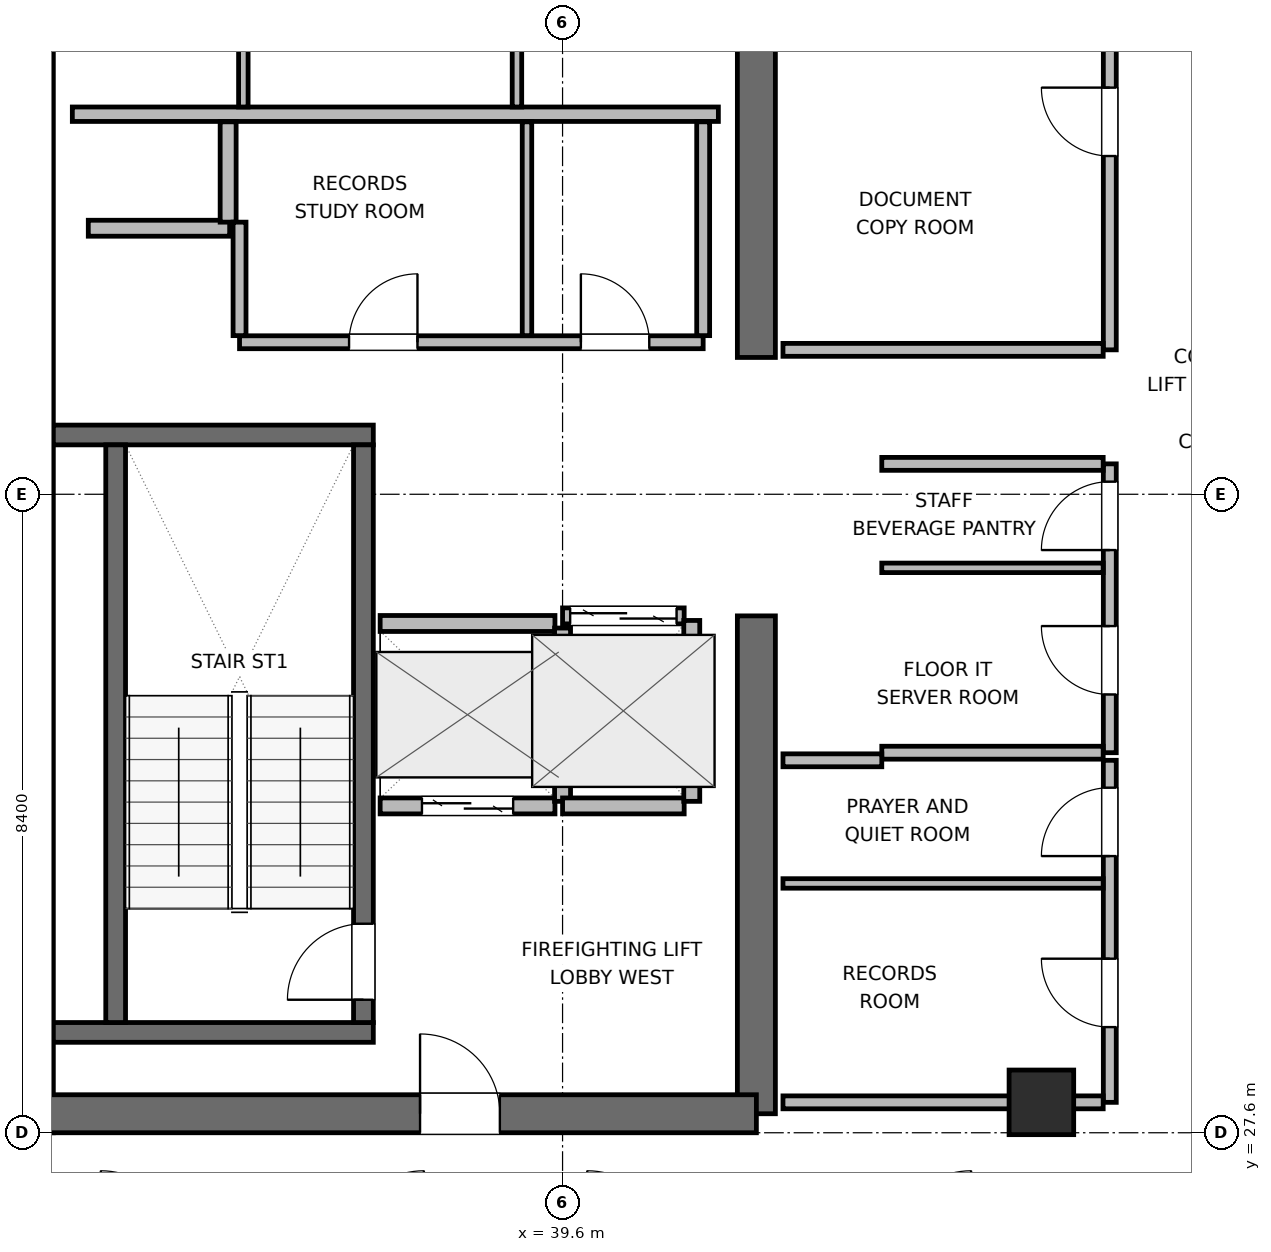
"""IFC4 building model, lengths in metres.
Left out: names, types, materials, properties, quantities, classifications, styles, units other than length and angle.
Written with IfcOpenShell. Run it as: python <this file> out.ifc"""

import sys

from ifc_helpers import new_model, si_unit, direction, frame, frame_2d, origin, origin_2d, place, context, subcontext, project, spatial, rectangle, extrude, element, fill, save


model = new_model("IFC4")
c1 = context("Model", 3, precision=1e-05, world=origin(), true_north=direction((0.0, 1.0)))
c2 = subcontext(c1, "Body", "Model", "MODEL_VIEW")
j1 = project(units=[si_unit("LENGTHUNIT", "METRE"), si_unit("PLANEANGLEUNIT", "RADIAN")], contexts=[c1])
p1 = place(None, origin())
s1 = spatial("IfcSite", under=j1, at=p1, CompositionType="ELEMENT")
p2 = place(p1, origin())
s2 = spatial("IfcBuilding", under=s1, at=p2, CompositionType="ELEMENT")
p3 = place(p2, frame((0.0, 0.0, 346.5)))
s3 = spatial("IfcBuildingStorey", under=s2, at=p3, CompositionType="ELEMENT", Elevation=346.5)
p4 = place(p3, frame((32.65, 27.6, 0.0), z_axis=(0.0, 0.0, 1.0), x_axis=(0.0, 1.0, 0.0)))
e1 = element("IfcWall", 1, at=p4, inside=s3, PredefinedType="SHEAR", context=c2, shape_type="SweptSolid", body=[
    extrude(rectangle(XDim=16.8, YDim=0.5, at=frame_2d((8.4, 0.0))), origin(), (0.0, 0.0, 1.0), 3.9),
])
p5 = place(p3, frame((42.15, 27.85, 0.0), z_axis=(0.0, 0.0, 1.0), x_axis=(0.0, 1.0, 0.0)))
e2 = element("IfcWall", 2, at=p5, inside=s3, PredefinedType="SHEAR", context=c2, shape_type="SweptSolid", body=[
    extrude(rectangle(XDim=6.55, YDim=0.5, at=frame_2d((3.275, 0.0))), origin(), (0.0, 0.0, 1.0), 3.9),
])
p6 = place(p3, frame((42.15, 37.8, 0.0), z_axis=(0.0, 0.0, 1.0), x_axis=(0.0, 1.0, 0.0)))
e3 = element("IfcWall", 3, at=p6, inside=s3, PredefinedType="SHEAR", context=c2, shape_type="SweptSolid", body=[
    extrude(rectangle(XDim=6.35, YDim=0.5, at=frame_2d((3.175, 0.0))), origin(), (0.0, 0.0, 1.0), 3.9),
])
p7 = place(p3, frame((32.65, 27.85, 0.0), z_axis=(0.0, 0.0, 1.0), x_axis=(1.0, 0.0, 0.0)))
e4 = element("IfcWall", 4, at=p7, inside=s3, PredefinedType="SHEAR", context=c2, shape_type="SweptSolid", body=[
    extrude(rectangle(XDim=9.5, YDim=0.5, at=frame_2d((4.75, 0.0))), origin(), (0.0, 0.0, 1.0), 3.9),
])
p8 = place(p7, frame((5.075, 0.0, 0.0)))
e5 = element("IfcOpeningElement", 5, at=p8, cuts=e4, PredefinedType="OPENING", context=c2, shape_type="SweptSolid", body=[
    extrude(rectangle(XDim=1.05, YDim=2.04, at=frame_2d((0.525, 1.02))), frame((0.0, 0.26, 0.0), z_axis=(0.0, -1.0, 0.0), x_axis=(1.0, 0.0, 0.0)), (0.0, 0.0, 1.0), 0.52),
])
for number, where, z_axis, x_axis in (
    (6, (32.9, 28.92, 0.0), (0.0, 0.0, 1.0), (1.0, 0.0, 0.0)),
    (7, (32.9, 36.78, 0.0), (0.0, 0.0, 1.0), (1.0, 0.0, 0.0)),
):
    element("IfcWall", number, at=place(p3, frame(where, z_axis=z_axis, x_axis=x_axis)), inside=s3, PredefinedType="SHEAR", context=c2, shape_type="SweptSolid", body=[
        extrude(rectangle(XDim=4.21, YDim=0.26, at=frame_2d((2.105, 0.0))), origin(), (0.0, 0.0, 1.0), 3.9),
    ])
p9 = place(p3, frame((33.72, 29.05, 0.0), z_axis=(0.0, 0.0, 1.0), x_axis=(0.0, 1.0, 0.0)))
e8 = element("IfcWall", 8, at=p9, inside=s3, PredefinedType="SHEAR", context=c2, shape_type="SweptSolid", body=[
    extrude(rectangle(XDim=7.6, YDim=0.26, at=frame_2d((3.8, 0.0))), origin(), (0.0, 0.0, 1.0), 3.9),
])
p10 = place(p3, frame((36.98, 29.05, 0.0), z_axis=(0.0, 0.0, 1.0), x_axis=(0.0, 1.0, 0.0)))
e9 = element("IfcWall", 9, at=p10, inside=s3, PredefinedType="SHEAR", context=c2, shape_type="SweptSolid", body=[
    extrude(rectangle(XDim=7.6, YDim=0.26, at=frame_2d((3.8, 0.0))), origin(), (0.0, 0.0, 1.0), 3.9),
])
p11 = place(p10, frame((0.3, 0.0, 0.0)))
e10 = element("IfcOpeningElement", 10, at=p11, cuts=e9, PredefinedType="OPENING", context=c2, shape_type="SweptSolid", body=[
    extrude(rectangle(XDim=1.0, YDim=2.04, at=frame_2d((0.5, 1.02))), frame((0.0, 0.14, 0.0), z_axis=(0.0, -1.0, 0.0), x_axis=(1.0, 0.0, 0.0)), (0.0, 0.0, 1.0), 0.28),
])
p12 = place(p3, frame((45.9, 28.0, 0.0), z_axis=(0.0, 0.0, 1.0), x_axis=(1.0, 0.0, 0.0)))
e11 = element("IfcColumn", 11, at=p12, inside=s3, PredefinedType="COLUMN", context=c2, shape_type="SweptSolid", body=[
    extrude(rectangle(XDim=0.85, YDim=0.85, at=origin_2d()), origin(), (0.0, 0.0, 1.0), 3.9),
])
p13 = place(p3, frame((33.15, 41.0, 0.0), z_axis=(0.0, 0.0, 1.0), x_axis=(1.0, 0.0, 0.0)))
e12 = element("IfcWall", 12, at=p13, inside=s3, PredefinedType="PLUMBINGWALL", context=c2, shape_type="SweptSolid", body=[
    extrude(rectangle(XDim=8.5, YDim=0.19, at=frame_2d((4.25, 0.0))), origin(), (0.0, 0.0, 1.0), 3.68),
])
for number, where, z_axis, x_axis in (
    (13, (35.4, 41.095, 0.0), (0.0, 0.0, 1.0), (0.0, 1.0, 0.0)),
    (14, (39.0, 41.095, 0.0), (0.0, 0.0, 1.0), (0.0, 1.0, 0.0)),
):
    element("IfcWall", number, at=place(p3, frame(where, z_axis=z_axis, x_axis=x_axis)), inside=s3, PredefinedType="PARTITIONING", context=c2, shape_type="SweptSolid", body=[
        extrude(rectangle(XDim=2.555, YDim=0.125, at=frame_2d((1.277, 0.0))), origin(), (0.0, 0.0, 1.0), 3.68),
    ])
p14 = place(p3, frame((33.36, 39.5, 0.0), z_axis=(0.0, 0.0, 1.0), x_axis=(1.0, 0.0, 0.0)))
e15 = element("IfcWall", 15, at=p14, inside=s3, PredefinedType="PARTITIONING", context=c2, shape_type="SweptSolid", body=[
    extrude(rectangle(XDim=1.86, YDim=0.21, at=frame_2d((0.93, 0.0))), origin(), (0.0, 0.0, 1.0), 3.68),
])
p15 = place(p3, frame((35.2, 39.58, 0.0), z_axis=(0.0, 0.0, 1.0), x_axis=(0.0, 1.0, 0.0)))
e16 = element("IfcWall", 16, at=p15, inside=s3, PredefinedType="PARTITIONING", context=c2, shape_type="SweptSolid", body=[
    extrude(rectangle(XDim=1.32, YDim=0.21, at=frame_2d((0.66, 0.0))), origin(), (0.0, 0.0, 1.0), 3.68),
])
p16 = place(p3, frame((37.2, 31.9, 0.0), z_axis=(0.0, 0.0, 1.0), x_axis=(1.0, 0.0, 0.0)))
e17 = element("IfcWall", 17, at=p16, inside=s3, PredefinedType="PARTITIONING", context=c2, shape_type="SweptSolid", body=[
    extrude(rectangle(XDim=2.3, YDim=0.21, at=frame_2d((1.15, 0.0))), origin(), (0.0, 0.0, 1.0), 3.68),
])
p17 = place(p16, frame((0.55, 0.0, 0.0)))
e18 = element("IfcOpeningElement", 18, at=p17, cuts=e17, PredefinedType="OPENING", context=c2, shape_type="SweptSolid", body=[
    extrude(rectangle(XDim=1.2, YDim=2.04, at=frame_2d((0.6, 1.02))), frame((0.0, 0.115, 0.0), z_axis=(0.0, -1.0, 0.0), x_axis=(1.0, 0.0, 0.0)), (0.0, 0.0, 1.0), 0.23),
])
p18 = place(p3, frame((37.2, 34.3, 0.0), z_axis=(0.0, 0.0, 1.0), x_axis=(1.0, 0.0, 0.0)))
e19 = element("IfcWall", 19, at=p18, inside=s3, PredefinedType="PARTITIONING", context=c2, shape_type="SweptSolid", body=[
    extrude(rectangle(XDim=2.3, YDim=0.21, at=frame_2d((1.15, 0.0))), origin(), (0.0, 0.0, 1.0), 3.68),
])
p19 = place(p3, frame((39.6, 31.96, 0.0), z_axis=(0.0, 0.0, 1.0), x_axis=(0.0, 1.0, 0.0)))
e20 = element("IfcWall", 20, at=p19, inside=s3, PredefinedType="PARTITIONING", context=c2, shape_type="SweptSolid", body=[
    extrude(rectangle(XDim=2.28, YDim=0.21, at=frame_2d((1.14, 0.0))), origin(), (0.0, 0.0, 1.0), 3.68),
])
p20 = place(p3, frame((39.6, 34.4, 0.0), z_axis=(0.0, 0.0, 1.0), x_axis=(1.0, 0.0, 0.0)))
e21 = element("IfcWall", 21, at=p20, inside=s3, PredefinedType="PARTITIONING", context=c2, shape_type="SweptSolid", body=[
    extrude(rectangle(XDim=1.6, YDim=0.21, at=frame_2d((0.8, 0.0))), origin(), (0.0, 0.0, 1.0), 3.68),
])
p21 = place(p20, frame((0.1, 0.0, 0.0)))
e22 = element("IfcOpeningElement", 22, at=p21, cuts=e21, PredefinedType="OPENING", context=c2, shape_type="SweptSolid", body=[
    extrude(rectangle(XDim=1.4, YDim=2.06, at=frame_2d((0.7, 1.03))), frame((0.0, 0.115, 0.0), z_axis=(0.0, -1.0, 0.0), x_axis=(1.0, 0.0, 0.0)), (0.0, 0.0, 1.0), 0.23),
])
p22 = place(p3, frame((39.6, 31.9, 0.0), z_axis=(0.0, 0.0, 1.0), x_axis=(1.0, 0.0, 0.0)))
e23 = element("IfcWall", 23, at=p22, inside=s3, PredefinedType="PARTITIONING", context=c2, shape_type="SweptSolid", body=[
    extrude(rectangle(XDim=1.6, YDim=0.21, at=frame_2d((0.8, 0.0))), origin(), (0.0, 0.0, 1.0), 3.68),
])
p23 = place(p3, frame((41.3, 31.96, 0.0), z_axis=(0.0, 0.0, 1.0), x_axis=(0.0, 1.0, 0.0)))
e24 = element("IfcWall", 24, at=p23, inside=s3, PredefinedType="PARTITIONING", context=c2, shape_type="SweptSolid", body=[
    extrude(rectangle(XDim=2.38, YDim=0.21, at=frame_2d((1.19, 0.0))), origin(), (0.0, 0.0, 1.0), 3.68),
])
p24 = place(p3, frame((35.35, 38.0, 0.0), z_axis=(0.0, 0.0, 1.0), x_axis=(1.0, 0.0, 0.0)))
e25 = element("IfcWall", 25, at=p24, inside=s3, PredefinedType="PARTITIONING", context=c2, shape_type="SweptSolid", body=[
    extrude(rectangle(XDim=6.1, YDim=0.17, at=frame_2d((3.05, 0.0))), origin(), (0.0, 0.0, 1.0), 3.68),
])
p25 = place(p24, frame((1.441, 0.0, 0.0)))
e26 = element("IfcOpeningElement", 26, at=p25, cuts=e25, PredefinedType="OPENING", context=c2, shape_type="SweptSolid", body=[
    extrude(rectangle(XDim=0.9, YDim=2.02, at=frame_2d((0.45, 1.01))), frame((0.0, 0.095, 0.0), z_axis=(0.0, -1.0, 0.0), x_axis=(1.0, 0.0, 0.0)), (0.0, 0.0, 1.0), 0.19),
])
p26 = place(p24, frame((4.491, 0.0, 0.0)))
e27 = element("IfcOpeningElement", 27, at=p26, cuts=e25, PredefinedType="OPENING", context=c2, shape_type="SweptSolid", body=[
    extrude(rectangle(XDim=0.9, YDim=2.02, at=frame_2d((0.45, 1.01))), frame((0.0, 0.095, 0.0), z_axis=(0.0, -1.0, 0.0), x_axis=(1.0, 0.0, 0.0)), (0.0, 0.0, 1.0), 0.19),
])
p27 = place(p3, frame((35.35, 38.087, 0.0), z_axis=(0.0, 0.0, 1.0), x_axis=(0.0, 1.0, 0.0)))
e28 = element("IfcWall", 28, at=p27, inside=s3, PredefinedType="PARTITIONING", context=c2, shape_type="SweptSolid", body=[
    extrude(rectangle(XDim=1.493, YDim=0.17, at=frame_2d((0.747, 0.0))), origin(), (0.0, 0.0, 1.0), 3.68),
])
p28 = place(p3, frame((41.45, 38.087, 0.0), z_axis=(0.0, 0.0, 1.0), x_axis=(0.0, 1.0, 0.0)))
e29 = element("IfcWall", 29, at=p28, inside=s3, PredefinedType="PARTITIONING", context=c2, shape_type="SweptSolid", body=[
    extrude(rectangle(XDim=2.813, YDim=0.17, at=frame_2d((1.406, 0.0))), origin(), (0.0, 0.0, 1.0), 3.68),
])
p29 = place(p3, frame((39.132, 38.087, 0.0), z_axis=(0.0, 0.0, 1.0), x_axis=(0.0, 1.0, 0.0)))
e30 = element("IfcWall", 30, at=p29, inside=s3, PredefinedType="PARTITIONING", context=c2, shape_type="SweptSolid", body=[
    extrude(rectangle(XDim=2.813, YDim=0.125, at=frame_2d((1.406, 0.0))), origin(), (0.0, 0.0, 1.0), 3.68),
])
p30 = place(p3, frame((46.8, 32.6, 0.0), z_axis=(0.0, 0.0, 1.0), x_axis=(0.0, 1.0, 0.0)))
e31 = element("IfcWall", 31, at=p30, inside=s3, PredefinedType="PARTITIONING", context=c2, shape_type="SweptSolid", body=[
    extrude(rectangle(XDim=3.8, YDim=0.17, at=frame_2d((1.9, 0.0))), origin(), (0.0, 0.0, 1.0), 3.68),
])
p31 = place(p30, frame((0.766, 0.0, 0.0)))
e32 = element("IfcOpeningElement", 32, at=p31, cuts=e31, PredefinedType="OPENING", context=c2, shape_type="SweptSolid", body=[
    extrude(rectangle(XDim=0.9, YDim=2.02, at=frame_2d((0.45, 1.01))), frame((0.0, 0.095, 0.0), z_axis=(0.0, -1.0, 0.0), x_axis=(1.0, 0.0, 0.0)), (0.0, 0.0, 1.0), 0.19),
])
p32 = place(p30, frame((2.666, 0.0, 0.0)))
e33 = element("IfcOpeningElement", 33, at=p32, cuts=e31, PredefinedType="OPENING", context=c2, shape_type="SweptSolid", body=[
    extrude(rectangle(XDim=0.9, YDim=2.02, at=frame_2d((0.45, 1.01))), frame((0.0, 0.095, 0.0), z_axis=(0.0, -1.0, 0.0), x_axis=(1.0, 0.0, 0.0)), (0.0, 0.0, 1.0), 0.19),
])
for number, where, z_axis, x_axis in (
    (34, (43.8, 32.6, 0.0), (0.0, 0.0, 1.0), (1.0, 0.0, 0.0)),
    (35, (43.8, 36.4, 0.0), (0.0, 0.0, 1.0), (1.0, 0.0, 0.0)),
):
    element("IfcWall", number, at=place(p3, frame(where, z_axis=z_axis, x_axis=x_axis)), inside=s3, PredefinedType="PARTITIONING", context=c2, shape_type="SweptSolid", body=[
        extrude(rectangle(XDim=2.913, YDim=0.17, at=frame_2d((1.457, 0.0))), origin(), (0.0, 0.0, 1.0), 3.68),
    ])
p33 = place(p3, frame((43.8, 35.032, 0.0), z_axis=(0.0, 0.0, 1.0), x_axis=(1.0, 0.0, 0.0)))
e36 = element("IfcWall", 36, at=p33, inside=s3, PredefinedType="PARTITIONING", context=c2, shape_type="SweptSolid", body=[
    extrude(rectangle(XDim=2.913, YDim=0.125, at=frame_2d((1.457, 0.0))), origin(), (0.0, 0.0, 1.0), 3.68),
])
p34 = place(p3, frame((46.8, 28.0, 0.0), z_axis=(0.0, 0.0, 1.0), x_axis=(0.0, 1.0, 0.0)))
e37 = element("IfcWall", 37, at=p34, inside=s3, PredefinedType="PARTITIONING", context=c2, shape_type="SweptSolid", body=[
    extrude(rectangle(XDim=4.5, YDim=0.17, at=frame_2d((2.25, 0.0))), origin(), (0.0, 0.0, 1.0), 3.68),
])
p35 = place(p34, frame((0.99, 0.0, 0.0)))
e38 = element("IfcOpeningElement", 38, at=p35, cuts=e37, PredefinedType="OPENING", context=c2, shape_type="SweptSolid", body=[
    extrude(rectangle(XDim=0.9, YDim=2.02, at=frame_2d((0.45, 1.01))), frame((0.0, 0.095, 0.0), z_axis=(0.0, -1.0, 0.0), x_axis=(1.0, 0.0, 0.0)), (0.0, 0.0, 1.0), 0.19),
])
p36 = place(p34, frame((3.24, 0.0, 0.0)))
e39 = element("IfcOpeningElement", 39, at=p36, cuts=e37, PredefinedType="OPENING", context=c2, shape_type="SweptSolid", body=[
    extrude(rectangle(XDim=0.9, YDim=2.02, at=frame_2d((0.45, 1.01))), frame((0.0, 0.095, 0.0), z_axis=(0.0, -1.0, 0.0), x_axis=(1.0, 0.0, 0.0)), (0.0, 0.0, 1.0), 0.19),
])
p37 = place(p3, frame((42.5, 28.0, 0.0), z_axis=(0.0, 0.0, 1.0), x_axis=(1.0, 0.0, 0.0)))
e40 = element("IfcWall", 40, at=p37, inside=s3, PredefinedType="PARTITIONING", context=c2, shape_type="SweptSolid", body=[
    extrude(rectangle(XDim=4.213, YDim=0.17, at=frame_2d((2.106, 0.0))), origin(), (0.0, 0.0, 1.0), 2.765),
])
p38 = place(p3, frame((42.5, 32.5, 0.0), z_axis=(0.0, 0.0, 1.0), x_axis=(1.0, 0.0, 0.0)))
e41 = element("IfcWall", 41, at=p38, inside=s3, PredefinedType="PARTITIONING", context=c2, shape_type="SweptSolid", body=[
    extrude(rectangle(XDim=1.3, YDim=0.17, at=frame_2d((0.65, 0.0))), origin(), (0.0, 0.0, 1.0), 3.68),
])
p39 = place(p3, frame((42.5, 30.88, 0.0), z_axis=(0.0, 0.0, 1.0), x_axis=(1.0, 0.0, 0.0)))
e42 = element("IfcWall", 42, at=p39, inside=s3, PredefinedType="PARTITIONING", context=c2, shape_type="SweptSolid", body=[
    extrude(rectangle(XDim=4.213, YDim=0.125, at=frame_2d((2.106, 0.0))), origin(), (0.0, 0.0, 1.0), 3.68),
])
p40 = place(p3, frame((46.8, 37.9, 0.0), z_axis=(0.0, 0.0, 1.0), x_axis=(0.0, 1.0, 0.0)))
e43 = element("IfcWall", 43, at=p40, inside=s3, PredefinedType="PARTITIONING", context=c2, shape_type="SweptSolid", body=[
    extrude(rectangle(XDim=6.0, YDim=0.17, at=frame_2d((3.0, 0.0))), origin(), (0.0, 0.0, 1.0), 3.68),
])
p41 = place(p40, frame((2.55, 0.0, 0.0)))
e44 = element("IfcOpeningElement", 44, at=p41, cuts=e43, PredefinedType="OPENING", context=c2, shape_type="SweptSolid", body=[
    extrude(rectangle(XDim=0.9, YDim=2.02, at=frame_2d((0.45, 1.01))), frame((0.0, 0.095, 0.0), z_axis=(0.0, -1.0, 0.0), x_axis=(1.0, 0.0, 0.0)), (0.0, 0.0, 1.0), 0.19),
])
p42 = place(p3, frame((42.5, 37.9, 0.0), z_axis=(0.0, 0.0, 1.0), x_axis=(1.0, 0.0, 0.0)))
e45 = element("IfcWall", 45, at=p42, inside=s3, PredefinedType="PARTITIONING", context=c2, shape_type="SweptSolid", body=[
    extrude(rectangle(XDim=4.213, YDim=0.17, at=frame_2d((2.106, 0.0))), origin(), (0.0, 0.0, 1.0), 3.68),
])
p43 = place(p11, origin())
e46 = element("IfcDoor", 46, at=p43, inside=s3, OperationType="SINGLE_SWING_LEFT", PredefinedType="DOOR", context=c2, shape_type="SweptSolid", body=[
    extrude(rectangle(XDim=1.0, YDim=2.04, at=frame_2d((0.5, 1.02))), frame((0.0, 0.025, 0.0), z_axis=(0.0, -1.0, 0.0), x_axis=(1.0, 0.0, 0.0)), (0.0, 0.0, 1.0), 0.05),
])
fill(e10, e46)
p44 = place(p17, origin())
e47 = element("IfcDoor", 47, at=p44, inside=s3, OperationType="DOUBLE_DOOR_SLIDING", PredefinedType="DOOR", context=c2, shape_type="SweptSolid", body=[
    extrude(rectangle(XDim=1.2, YDim=2.04, at=frame_2d((0.6, 1.02))), frame((0.0, 0.025, 0.0), z_axis=(0.0, -1.0, 0.0), x_axis=(1.0, 0.0, 0.0)), (0.0, 0.0, 1.0), 0.05),
])
fill(e18, e47)
p45 = place(p21, origin())
e48 = element("IfcDoor", 48, at=p45, inside=s3, OperationType="DOUBLE_DOOR_SLIDING", PredefinedType="DOOR", context=c2, shape_type="SweptSolid", body=[
    extrude(rectangle(XDim=1.4, YDim=2.06, at=frame_2d((0.7, 1.03))), frame((0.0, 0.025, 0.0), z_axis=(0.0, -1.0, 0.0), x_axis=(1.0, 0.0, 0.0)), (0.0, 0.0, 1.0), 0.05),
])
fill(e22, e48)
p46 = place(p8, origin())
e49 = element("IfcDoor", 49, at=p46, inside=s3, OperationType="SINGLE_SWING_LEFT", PredefinedType="DOOR", context=c2, shape_type="SweptSolid", body=[
    extrude(rectangle(XDim=1.05, YDim=2.04, at=frame_2d((0.525, 1.02))), frame((0.0, 0.025, 0.0), z_axis=(0.0, -1.0, 0.0), x_axis=(1.0, 0.0, 0.0)), (0.0, 0.0, 1.0), 0.05),
])
fill(e5, e49)
p47 = place(p25, origin())
e50 = element("IfcDoor", 50, at=p47, inside=s3, OperationType="SINGLE_SWING_RIGHT", PredefinedType="DOOR", context=c2, shape_type="SweptSolid", body=[
    extrude(rectangle(XDim=0.9, YDim=2.02, at=frame_2d((0.45, 1.01))), frame((0.0, 0.025, 0.0), z_axis=(0.0, -1.0, 0.0), x_axis=(1.0, 0.0, 0.0)), (0.0, 0.0, 1.0), 0.05),
])
fill(e26, e50)
p48 = place(p26, origin())
e51 = element("IfcDoor", 51, at=p48, inside=s3, OperationType="SINGLE_SWING_LEFT", PredefinedType="DOOR", context=c2, shape_type="SweptSolid", body=[
    extrude(rectangle(XDim=0.9, YDim=2.02, at=frame_2d((0.45, 1.01))), frame((0.0, 0.025, 0.0), z_axis=(0.0, -1.0, 0.0), x_axis=(1.0, 0.0, 0.0)), (0.0, 0.0, 1.0), 0.05),
])
fill(e27, e51)
p49 = place(p31, origin())
e52 = element("IfcDoor", 52, at=p49, inside=s3, OperationType="SINGLE_SWING_RIGHT", PredefinedType="DOOR", context=c2, shape_type="SweptSolid", body=[
    extrude(rectangle(XDim=0.9, YDim=2.02, at=frame_2d((0.45, 1.01))), frame((0.0, 0.025, 0.0), z_axis=(0.0, -1.0, 0.0), x_axis=(1.0, 0.0, 0.0)), (0.0, 0.0, 1.0), 0.05),
])
fill(e32, e52)
p50 = place(p32, origin())
e53 = element("IfcDoor", 53, at=p50, inside=s3, OperationType="SINGLE_SWING_LEFT", PredefinedType="DOOR", context=c2, shape_type="SweptSolid", body=[
    extrude(rectangle(XDim=0.9, YDim=2.02, at=frame_2d((0.45, 1.01))), frame((0.0, 0.025, 0.0), z_axis=(0.0, -1.0, 0.0), x_axis=(1.0, 0.0, 0.0)), (0.0, 0.0, 1.0), 0.05),
])
fill(e33, e53)
p51 = place(p35, origin())
e54 = element("IfcDoor", 54, at=p51, inside=s3, OperationType="SINGLE_SWING_RIGHT", PredefinedType="DOOR", context=c2, shape_type="SweptSolid", body=[
    extrude(rectangle(XDim=0.9, YDim=2.02, at=frame_2d((0.45, 1.01))), frame((0.0, 0.025, 0.0), z_axis=(0.0, -1.0, 0.0), x_axis=(1.0, 0.0, 0.0)), (0.0, 0.0, 1.0), 0.05),
])
fill(e38, e54)
p52 = place(p36, origin())
e55 = element("IfcDoor", 55, at=p52, inside=s3, OperationType="SINGLE_SWING_LEFT", PredefinedType="DOOR", context=c2, shape_type="SweptSolid", body=[
    extrude(rectangle(XDim=0.9, YDim=2.02, at=frame_2d((0.45, 1.01))), frame((0.0, 0.025, 0.0), z_axis=(0.0, -1.0, 0.0), x_axis=(1.0, 0.0, 0.0)), (0.0, 0.0, 1.0), 0.05),
])
fill(e39, e55)
p53 = place(p41, origin())
e56 = element("IfcDoor", 56, at=p53, inside=s3, OperationType="SINGLE_SWING_RIGHT", PredefinedType="DOOR", context=c2, shape_type="SweptSolid", body=[
    extrude(rectangle(XDim=0.9, YDim=2.02, at=frame_2d((0.45, 1.01))), frame((0.0, 0.025, 0.0), z_axis=(0.0, -1.0, 0.0), x_axis=(1.0, 0.0, 0.0)), (0.0, 0.0, 1.0), 0.05),
])
fill(e44, e56)
save(model, sys.argv[1])
